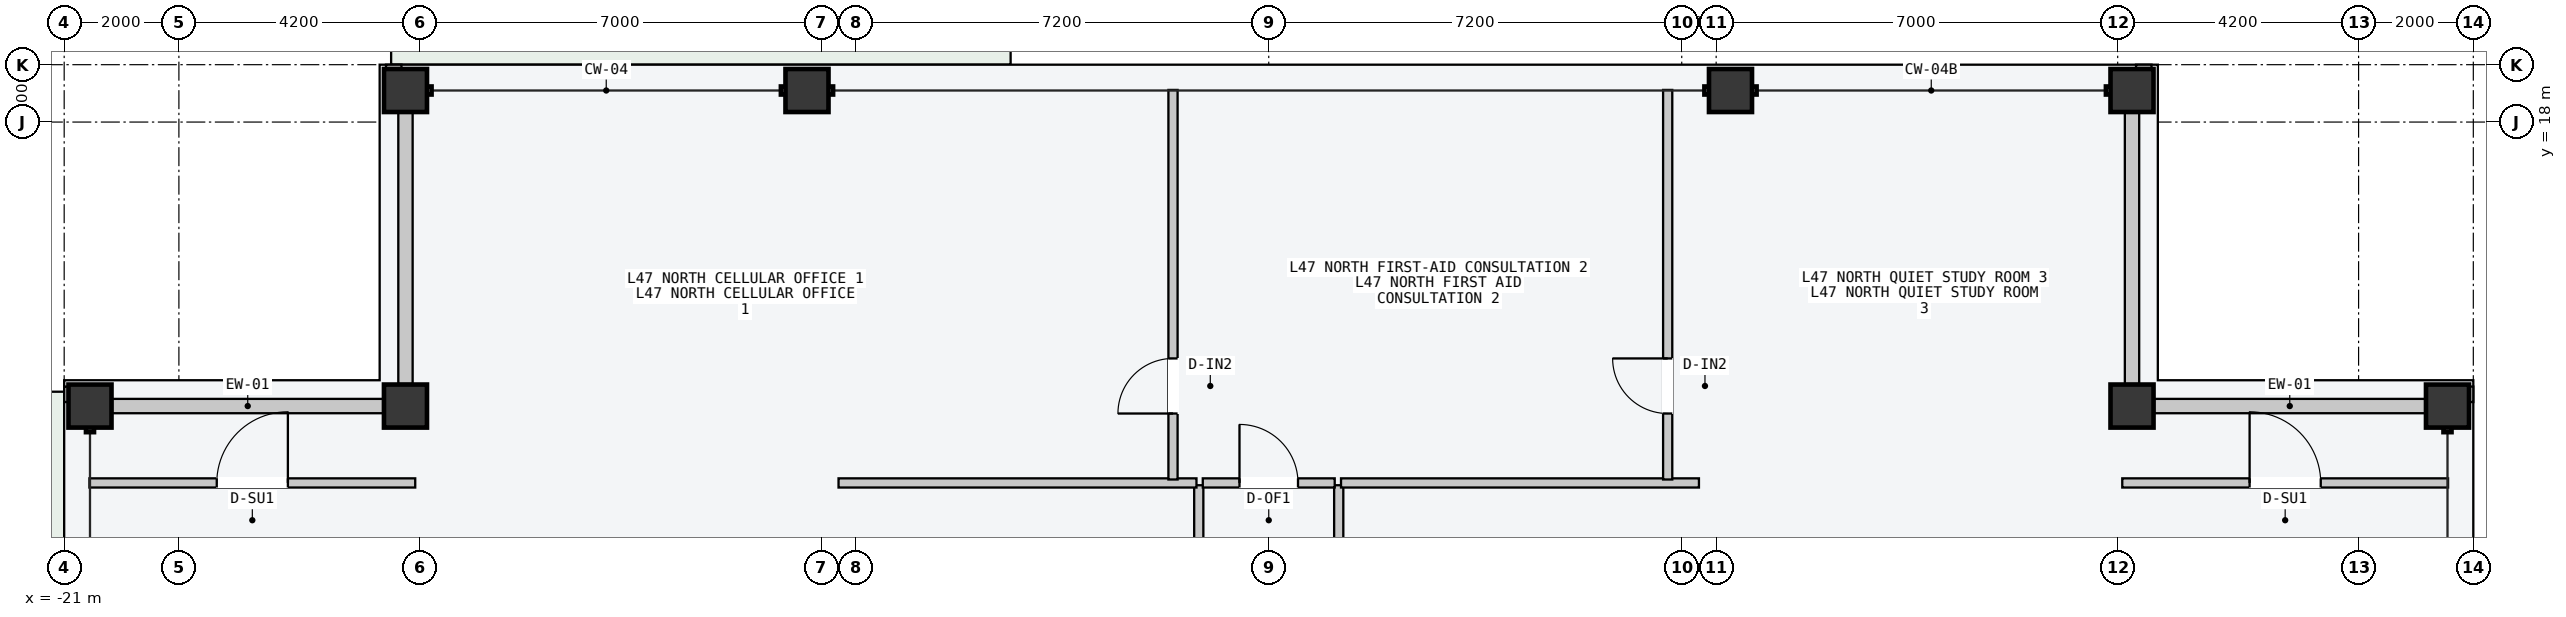
"""IFC4 building model, lengths in metres.
Left out: names, types, materials, properties, quantities, classifications, styles, units other than length and angle.
Written with IfcOpenShell. Run it as: python <this file> out.ifc"""

import sys

from ifc_helpers import new_model, si_unit, direction, frame, frame_2d, origin, origin_2d, place, context, subcontext, project, spatial, rectangle, hollow_rectangle, extrude, element, fill, save


model = new_model("IFC4")
c1 = context("Model", 3, precision=1e-05, world=origin(), true_north=direction((0.0, 1.0)))
c2 = subcontext(c1, "Body", "Model", "MODEL_VIEW")
j1 = project(units=[si_unit("LENGTHUNIT", "METRE"), si_unit("PLANEANGLEUNIT", "RADIAN")], contexts=[c1])
p1 = place(None, origin())
s1 = spatial("IfcSite", under=j1, at=p1, CompositionType="ELEMENT")
p2 = place(p1, origin())
s2 = spatial("IfcBuilding", under=s1, at=p2, CompositionType="ELEMENT")
p3 = place(p2, frame((0.0, 0.0, 180.3)))
s3 = spatial("IfcBuildingStorey", under=s2, at=p3, CompositionType="ELEMENT", Elevation=180.3)
for number, where, z_axis, x_axis in (
    (1, (-15.05, 18.55, 0.0), (0.0, 0.0, 1.0), (1.0, 0.0, 0.0)),
    (2, (-8.05, 18.55, 0.0), (0.0, 0.0, 1.0), (1.0, 0.0, 0.0)),
    (3, (8.05, 18.55, 0.0), (0.0, 0.0, 1.0), (1.0, 0.0, 0.0)),
    (4, (15.05, 18.55, 0.0), (0.0, 0.0, 1.0), (1.0, 0.0, 0.0)),
    (5, (-20.55, 13.05, 0.0), (0.0, 0.0, 1.0), (0.0, 1.0, 0.0)),
    (6, (20.55, 13.05, 0.0), (0.0, 0.0, 1.0), (0.0, 1.0, 0.0)),
    (7, (-15.05, 13.05, 0.0), (0.0, 0.0, 1.0), (1.0, 0.0, 0.0)),
    (8, (15.05, 13.05, 0.0), (0.0, 0.0, 1.0), (1.0, 0.0, 0.0)),
):
    element("IfcColumn", number, at=place(p3, frame(where, z_axis=z_axis, x_axis=x_axis)), inside=s3, PredefinedType="COLUMN", context=c2, shape_type="SweptSolid", body=[
        extrude(hollow_rectangle(XDim=0.75, YDim=0.75, WallThickness=0.032, at=origin_2d()), origin(), (0.0, 0.0, 1.0), 3.6),
    ])
for number, where, z_axis, x_axis in (
    (9, (-20.165, 13.05, 0.0), (0.0, 0.0, 1.0), (1.0, 0.0, 0.0)),
    (10, (-15.05, 13.435, 0.0), (0.0, 0.0, 1.0), (0.0, 1.0, 0.0)),
    (11, (15.435, 13.05, 0.0), (0.0, 0.0, 1.0), (1.0, 0.0, 0.0)),
    (12, (15.05, 13.435, 0.0), (0.0, 0.0, 1.0), (0.0, 1.0, 0.0)),
):
    element("IfcWall", number, at=place(p3, frame(where, z_axis=z_axis, x_axis=x_axis)), inside=s3, PredefinedType="STANDARD", context=c2, shape_type="SweptSolid", body=[
        extrude(rectangle(XDim=4.73, YDim=0.25, at=frame_2d((2.365, 0.0))), origin(), (0.0, 0.0, 1.0), 2.75),
    ])
for number, where, z_axis, x_axis in (
    (13, (-15.39, 18.89, 0.0), (0.0, 0.0, 1.0), (1.0, 0.0, 0.0)),
    (14, (-20.89, 13.12, 0.0), (0.0, 0.0, 1.0), (0.0, 1.0, 0.0)),
    (15, (15.12, 18.89, 0.0), (0.0, 0.0, 1.0), (1.0, 0.0, 0.0)),
    (16, (20.89, 13.12, 0.0), (0.0, 0.0, 1.0), (0.0, 1.0, 0.0)),
):
    element("IfcWall", number, at=place(p3, frame(where, z_axis=z_axis, x_axis=x_axis)), inside=s3, PredefinedType="PARAPET", context=c2, shape_type="SweptSolid", body=[
        extrude(rectangle(XDim=0.27, YDim=0.22, at=frame_2d((0.135, 0.0))), origin(), (0.0, 0.0, 1.0), 1.2),
    ])
p4 = place(p3, frame((-1.22, -3.5, 0.0), z_axis=(0.0, 0.0, 1.0), x_axis=(0.0, 1.0, 0.0)))
e17 = element("IfcWall", 17, at=p4, inside=s3, PredefinedType="PARTITIONING", context=c2, shape_type="SweptSolid", body=[
    extrude(rectangle(XDim=15.17, YDim=0.16, at=frame_2d((7.585, 0.0))), origin(), (0.0, 0.0, 1.0), 3.4),
])
p5 = place(p4, frame((6.1, 0.0, 0.0)))
e18 = element("IfcOpeningElement", 18, at=p5, cuts=e17, PredefinedType="OPENING", context=c2, shape_type="SweptSolid", body=[
    extrude(rectangle(XDim=1.24, YDim=2.24, at=frame_2d((0.62, 1.12))), frame((0.0, 0.09, 0.0), z_axis=(0.0, -1.0, 0.0), x_axis=(1.0, 0.0, 0.0)), (0.0, 0.0, 1.0), 0.18),
])
p6 = place(p4, frame((1.6, 0.0, 0.0)))
e19 = element("IfcOpeningElement", 19, at=p6, cuts=e17, PredefinedType="OPENING", context=c2, shape_type="SweptSolid", body=[
    extrude(rectangle(XDim=0.96, YDim=2.18, at=frame_2d((0.48, 1.09))), frame((0.0, 0.09, 0.0), z_axis=(0.0, -1.0, 0.0), x_axis=(1.0, 0.0, 0.0)), (0.0, 0.0, 1.0), 0.18),
])
p7 = place(p3, frame((-7.5, 11.71, 0.0), z_axis=(0.0, 0.0, 1.0), x_axis=(1.0, 0.0, 0.0)))
e20 = element("IfcWall", 20, at=p7, inside=s3, PredefinedType="PARTITIONING", context=c2, shape_type="SweptSolid", body=[
    extrude(rectangle(XDim=6.24, YDim=0.16, at=frame_2d((3.12, 0.0))), origin(), (0.0, 0.0, 1.0), 3.4),
])
p8 = place(p3, frame((1.22, -3.5, 0.0), z_axis=(0.0, 0.0, 1.0), x_axis=(0.0, 1.0, 0.0)))
e21 = element("IfcWall", 21, at=p8, inside=s3, PredefinedType="PARTITIONING", context=c2, shape_type="SweptSolid", body=[
    extrude(rectangle(XDim=15.17, YDim=0.16, at=frame_2d((7.585, 0.0))), origin(), (0.0, 0.0, 1.0), 3.4),
])
p9 = place(p8, frame((6.1, 0.0, 0.0)))
e22 = element("IfcOpeningElement", 22, at=p9, cuts=e21, PredefinedType="OPENING", context=c2, shape_type="SweptSolid", body=[
    extrude(rectangle(XDim=1.24, YDim=2.24, at=frame_2d((0.62, 1.12))), frame((0.0, 0.09, 0.0), z_axis=(0.0, -1.0, 0.0), x_axis=(1.0, 0.0, 0.0)), (0.0, 0.0, 1.0), 0.18),
])
p10 = place(p8, frame((1.6, 0.0, 0.0)))
e23 = element("IfcOpeningElement", 23, at=p10, cuts=e21, PredefinedType="OPENING", context=c2, shape_type="SweptSolid", body=[
    extrude(rectangle(XDim=0.96, YDim=2.18, at=frame_2d((0.48, 1.09))), frame((0.0, 0.09, 0.0), z_axis=(0.0, -1.0, 0.0), x_axis=(1.0, 0.0, 0.0)), (0.0, 0.0, 1.0), 0.18),
])
p11 = place(p3, frame((1.26, 11.71, 0.0), z_axis=(0.0, 0.0, 1.0), x_axis=(1.0, 0.0, 0.0)))
e24 = element("IfcWall", 24, at=p11, inside=s3, PredefinedType="PARTITIONING", context=c2, shape_type="SweptSolid", body=[
    extrude(rectangle(XDim=6.24, YDim=0.16, at=frame_2d((3.12, 0.0))), origin(), (0.0, 0.0, 1.0), 3.4),
])
p12 = place(p3, frame((-1.669, 11.77, 0.0), z_axis=(0.0, 0.0, 1.0), x_axis=(0.0, 1.0, 0.0)))
e25 = element("IfcWall", 25, at=p12, inside=s3, PredefinedType="PARTITIONING", context=c2, shape_type="SweptSolid", body=[
    extrude(rectangle(XDim=6.79, YDim=0.16, at=frame_2d((3.395, 0.0))), origin(), (0.0, 0.0, 1.0), 3.4),
])
p13 = place(p12, frame((1.15, 0.0, 0.0)))
e26 = element("IfcOpeningElement", 26, at=p13, cuts=e25, PredefinedType="OPENING", context=c2, shape_type="SweptSolid", body=[
    extrude(rectangle(XDim=0.96, YDim=2.18, at=frame_2d((0.48, 1.09))), frame((0.0, 0.09, 0.0), z_axis=(0.0, -1.0, 0.0), x_axis=(1.0, 0.0, 0.0)), (0.0, 0.0, 1.0), 0.18),
])
p14 = place(p3, frame((6.955, 11.77, 0.0), z_axis=(0.0, 0.0, 1.0), x_axis=(0.0, 1.0, 0.0)))
e27 = element("IfcWall", 27, at=p14, inside=s3, PredefinedType="PARTITIONING", context=c2, shape_type="SweptSolid", body=[
    extrude(rectangle(XDim=6.79, YDim=0.16, at=frame_2d((3.395, 0.0))), origin(), (0.0, 0.0, 1.0), 3.4),
])
p15 = place(p14, frame((1.15, 0.0, 0.0)))
e28 = element("IfcOpeningElement", 28, at=p15, cuts=e27, PredefinedType="OPENING", context=c2, shape_type="SweptSolid", body=[
    extrude(rectangle(XDim=0.96, YDim=2.18, at=frame_2d((0.48, 1.09))), frame((0.0, 0.09, 0.0), z_axis=(0.0, -1.0, 0.0), x_axis=(1.0, 0.0, 0.0)), (0.0, 0.0, 1.0), 0.18),
])
p16 = place(p3, frame((-1.15, 11.71, 0.0), z_axis=(0.0, 0.0, 1.0), x_axis=(1.0, 0.0, 0.0)))
e29 = element("IfcWall", 29, at=p16, inside=s3, PredefinedType="PARTITIONING", context=c2, shape_type="SweptSolid", body=[
    extrude(rectangle(XDim=2.3, YDim=0.16, at=frame_2d((1.15, 0.0))), origin(), (0.0, 0.0, 1.0), 3.4),
])
p17 = place(p16, frame((0.64, 0.0, 0.0)))
e30 = element("IfcOpeningElement", 30, at=p17, cuts=e29, PredefinedType="OPENING", context=c2, shape_type="SweptSolid", body=[
    extrude(rectangle(XDim=1.02, YDim=2.2, at=frame_2d((0.51, 1.1))), frame((0.0, 0.09, 0.0), z_axis=(0.0, -1.0, 0.0), x_axis=(1.0, 0.0, 0.0)), (0.0, 0.0, 1.0), 0.18),
])
p18 = place(p3, frame((-20.56, 11.71, 0.0), z_axis=(0.0, 0.0, 1.0), x_axis=(1.0, 0.0, 0.0)))
e31 = element("IfcWall", 31, at=p18, inside=s3, PredefinedType="PARTITIONING", context=c2, shape_type="SweptSolid", body=[
    extrude(rectangle(XDim=5.68, YDim=0.16, at=frame_2d((2.84, 0.0))), origin(), (0.0, 0.0, 1.0), 3.4),
])
p19 = place(p18, frame((2.22, 0.0, 0.0)))
e32 = element("IfcOpeningElement", 32, at=p19, cuts=e31, PredefinedType="OPENING", context=c2, shape_type="SweptSolid", body=[
    extrude(rectangle(XDim=1.24, YDim=2.24, at=frame_2d((0.62, 1.12))), frame((0.0, 0.09, 0.0), z_axis=(0.0, -1.0, 0.0), x_axis=(1.0, 0.0, 0.0)), (0.0, 0.0, 1.0), 0.18),
])
p20 = place(p3, frame((14.88, 11.71, 0.0), z_axis=(0.0, 0.0, 1.0), x_axis=(1.0, 0.0, 0.0)))
e33 = element("IfcWall", 33, at=p20, inside=s3, PredefinedType="PARTITIONING", context=c2, shape_type="SweptSolid", body=[
    extrude(rectangle(XDim=5.68, YDim=0.16, at=frame_2d((2.84, 0.0))), origin(), (0.0, 0.0, 1.0), 3.4),
])
p21 = place(p20, frame((2.22, 0.0, 0.0)))
e34 = element("IfcOpeningElement", 34, at=p21, cuts=e33, PredefinedType="OPENING", context=c2, shape_type="SweptSolid", body=[
    extrude(rectangle(XDim=1.24, YDim=2.24, at=frame_2d((0.62, 1.12))), frame((0.0, 0.09, 0.0), z_axis=(0.0, -1.0, 0.0), x_axis=(1.0, 0.0, 0.0)), (0.0, 0.0, 1.0), 0.18),
])
p22 = place(p13, origin())
e35 = element("IfcDoor", 35, at=p22, inside=s3, OperationType="SINGLE_SWING_LEFT", PredefinedType="DOOR", context=c2, shape_type="SweptSolid", body=[
    extrude(rectangle(XDim=0.96, YDim=2.18, at=frame_2d((0.48, 1.09))), frame((0.0, 0.025, 0.0), z_axis=(0.0, -1.0, 0.0), x_axis=(1.0, 0.0, 0.0)), (0.0, 0.0, 1.0), 0.05),
])
fill(e26, e35)
p23 = place(p15, origin())
e36 = element("IfcDoor", 36, at=p23, inside=s3, OperationType="SINGLE_SWING_RIGHT", PredefinedType="DOOR", context=c2, shape_type="SweptSolid", body=[
    extrude(rectangle(XDim=0.96, YDim=2.18, at=frame_2d((0.48, 1.09))), frame((0.0, 0.025, 0.0), z_axis=(0.0, -1.0, 0.0), x_axis=(1.0, 0.0, 0.0)), (0.0, 0.0, 1.0), 0.05),
])
fill(e28, e36)
p24 = place(p17, origin())
e37 = element("IfcDoor", 37, at=p24, inside=s3, OperationType="SINGLE_SWING_LEFT", PredefinedType="DOOR", context=c2, shape_type="SweptSolid", body=[
    extrude(rectangle(XDim=1.02, YDim=2.2, at=frame_2d((0.51, 1.1))), frame((0.0, 0.025, 0.0), z_axis=(0.0, -1.0, 0.0), x_axis=(1.0, 0.0, 0.0)), (0.0, 0.0, 1.0), 0.05),
])
fill(e30, e37)
p25 = place(p19, origin())
e38 = element("IfcDoor", 38, at=p25, inside=s3, OperationType="SINGLE_SWING_RIGHT", PredefinedType="DOOR", context=c2, shape_type="SweptSolid", body=[
    extrude(rectangle(XDim=1.24, YDim=2.24, at=frame_2d((0.62, 1.12))), frame((0.0, 0.025, 0.0), z_axis=(0.0, -1.0, 0.0), x_axis=(1.0, 0.0, 0.0)), (0.0, 0.0, 1.0), 0.05),
])
fill(e32, e38)
p26 = place(p21, origin())
e39 = element("IfcDoor", 39, at=p26, inside=s3, OperationType="SINGLE_SWING_LEFT", PredefinedType="DOOR", context=c2, shape_type="SweptSolid", body=[
    extrude(rectangle(XDim=1.24, YDim=2.24, at=frame_2d((0.62, 1.12))), frame((0.0, 0.025, 0.0), z_axis=(0.0, -1.0, 0.0), x_axis=(1.0, 0.0, 0.0)), (0.0, 0.0, 1.0), 0.05),
])
fill(e34, e39)
save(model, sys.argv[1])
